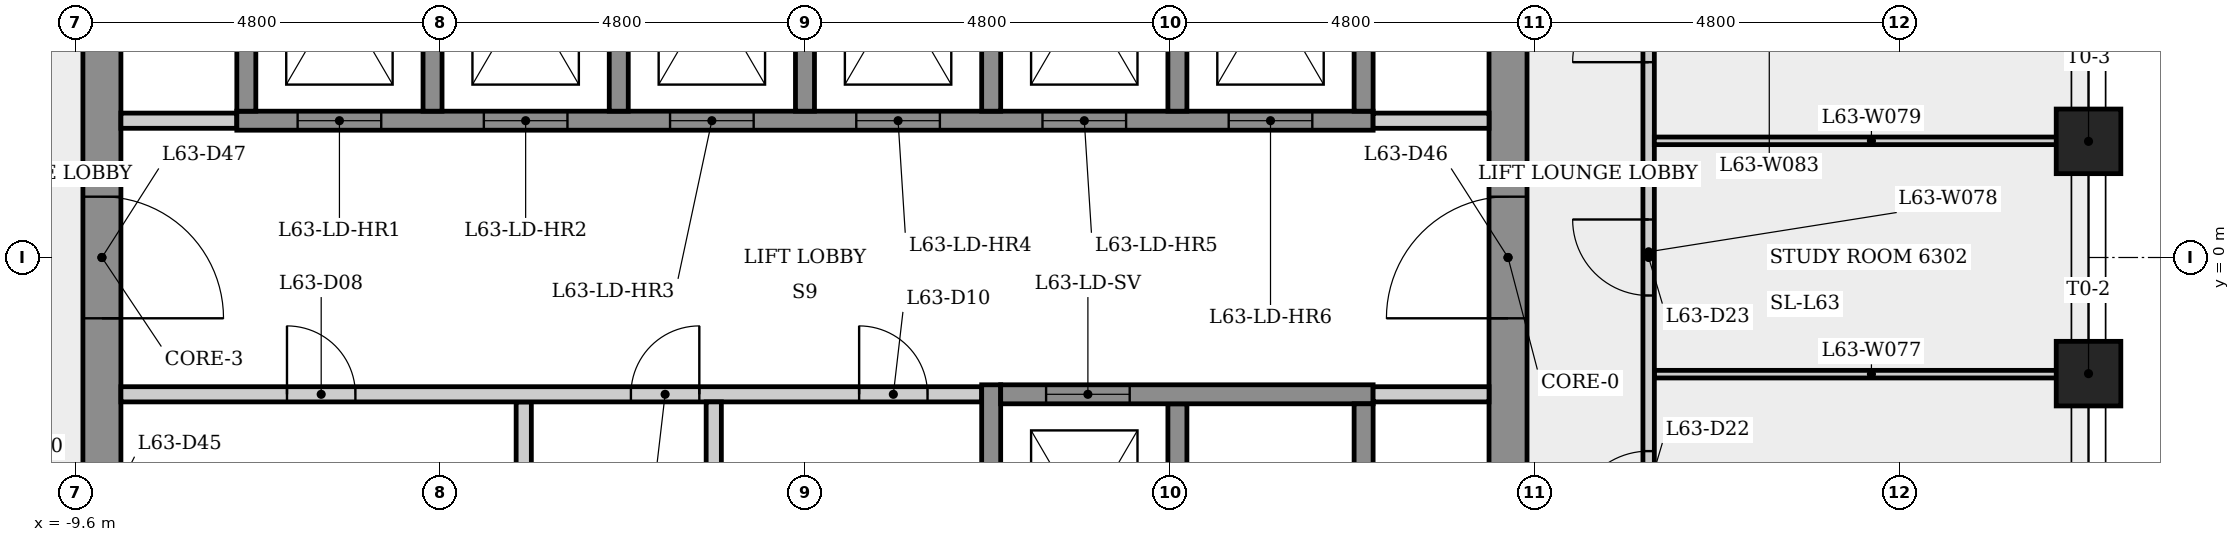
"""IFC4 building model, lengths in metres.
Left out: names, types, materials, properties, quantities, classifications, styles, units other than length and angle.
Written with IfcOpenShell. Run it as: python <this file> out.ifc"""

import sys

from ifc_helpers import new_model, si_unit, direction, frame, frame_2d, origin, origin_2d, place, context, subcontext, project, spatial, rectangle, extrude, element, fill, save


model = new_model("IFC4")
c1 = context("Model", 3, precision=1e-05, world=origin(), true_north=direction((0.0, 1.0)))
c2 = subcontext(c1, "Body", "Model", "MODEL_VIEW")
j1 = project(units=[si_unit("LENGTHUNIT", "METRE"), si_unit("PLANEANGLEUNIT", "RADIAN")], contexts=[c1])
p1 = place(None, origin())
s1 = spatial("IfcSite", under=j1, at=p1, CompositionType="ELEMENT")
p2 = place(p1, origin())
s2 = spatial("IfcBuilding", under=s1, at=p2, CompositionType="ELEMENT")
p3 = place(p2, frame((0.0, 0.0, 235.9)))
s3 = spatial("IfcBuildingStorey", under=s2, at=p3, CompositionType="ELEMENT", Elevation=235.9)
p4 = place(p3, frame((9.25, -5.485, 0.0), z_axis=(0.0, 0.0, 1.0), x_axis=(0.0, 1.0, 0.0)))
e1 = element("IfcWall", 1, at=p4, inside=s3, PredefinedType="SHEAR", context=c2, shape_type="SweptSolid", body=[
    extrude(rectangle(XDim=10.97, YDim=0.5, at=frame_2d((5.485, 0.0))), origin(), (0.0, 0.0, 1.0), 3.4),
])
p5 = place(p4, frame((4.685, 0.0, 0.0)))
e2 = element("IfcOpeningElement", 2, at=p5, cuts=e1, PredefinedType="OPENING", context=c2, shape_type="SweptSolid", body=[
    extrude(rectangle(XDim=1.6, YDim=2.1, at=frame_2d((0.8, 1.05))), frame((0.0, 0.26, 0.0), z_axis=(0.0, -1.0, 0.0), x_axis=(1.0, 0.0, 0.0)), (0.0, 0.0, 1.0), 0.52),
])
p6 = place(p3, frame((-9.25, 5.485, 0.0), z_axis=(0.0, 0.0, 1.0), x_axis=(0.0, -1.0, 0.0)))
e3 = element("IfcWall", 3, at=p6, inside=s3, PredefinedType="SHEAR", context=c2, shape_type="SweptSolid", body=[
    extrude(rectangle(XDim=10.97, YDim=0.5, at=frame_2d((5.485, 0.0))), origin(), (0.0, 0.0, 1.0), 3.4),
])
p7 = place(p6, frame((8.51, 0.0, 0.0)))
e4 = element("IfcOpeningElement", 4, at=p7, cuts=e3, PredefinedType="OPENING", context=c2, shape_type="SweptSolid", body=[
    extrude(rectangle(XDim=0.9, YDim=2.1, at=frame_2d((0.45, 1.05))), frame((0.0, 0.26, 0.0), z_axis=(0.0, -1.0, 0.0), x_axis=(1.0, 0.0, 0.0)), (0.0, 0.0, 1.0), 0.52),
])
p8 = place(p6, frame((4.685, 0.0, 0.0)))
e5 = element("IfcOpeningElement", 5, at=p8, cuts=e3, PredefinedType="OPENING", context=c2, shape_type="SweptSolid", body=[
    extrude(rectangle(XDim=1.6, YDim=2.1, at=frame_2d((0.8, 1.05))), frame((0.0, 0.26, 0.0), z_axis=(0.0, -1.0, 0.0), x_axis=(1.0, 0.0, 0.0)), (0.0, 0.0, 1.0), 0.52),
])
for number, where, z_axis, x_axis in (
    (6, (16.887, -1.528, 0.0), (0.0, 0.0, 1.0), (1.0, 0.0, 0.0)),
    (7, (16.887, 1.528, 0.0), (0.0, 0.0, 1.0), (1.0, 0.0, 0.0)),
):
    element("IfcColumn", number, at=place(p3, frame(where, z_axis=z_axis, x_axis=x_axis)), inside=s3, PredefinedType="COLUMN", context=c2, shape_type="SweptSolid", body=[
        extrude(rectangle(XDim=0.85, YDim=0.85, at=origin_2d()), origin(), (0.0, 0.0, 1.0), 3.4),
    ])
p9 = place(p3, frame((-9.0, 1.8, 0.0), z_axis=(0.0, 0.0, 1.0), x_axis=(1.0, 0.0, 0.0)))
e8 = element("IfcWall", 8, at=p9, inside=s3, PredefinedType="PARTITIONING", context=c2, shape_type="SweptSolid", body=[
    extrude(rectangle(XDim=1.525, YDim=0.2, at=frame_2d((0.763, 0.0))), origin(), (0.0, 0.0, 1.0), 3.05),
])
p10 = place(p3, frame((-7.475, 1.8, 0.0), z_axis=(0.0, 0.0, 1.0), x_axis=(1.0, 0.0, 0.0)))
e9 = element("IfcWall", 9, at=p10, inside=s3, PredefinedType="SHEAR", context=c2, shape_type="SweptSolid", body=[
    extrude(rectangle(XDim=14.95, YDim=0.25, at=frame_2d((7.475, 0.0))), origin(), (0.0, 0.0, 1.0), 3.05),
])
p11 = place(p10, frame((0.8, 0.0, 0.0)))
e10 = element("IfcOpeningElement", 10, at=p11, cuts=e9, PredefinedType="OPENING", context=c2, shape_type="SweptSolid", body=[
    extrude(rectangle(XDim=1.1, YDim=2.1, at=frame_2d((0.55, 1.05))), frame((0.0, 0.135, 0.0), z_axis=(0.0, -1.0, 0.0), x_axis=(1.0, 0.0, 0.0)), (0.0, 0.0, 1.0), 0.27),
])
p12 = place(p10, frame((3.25, 0.0, 0.0)))
e11 = element("IfcOpeningElement", 11, at=p12, cuts=e9, PredefinedType="OPENING", context=c2, shape_type="SweptSolid", body=[
    extrude(rectangle(XDim=1.1, YDim=2.1, at=frame_2d((0.55, 1.05))), frame((0.0, 0.135, 0.0), z_axis=(0.0, -1.0, 0.0), x_axis=(1.0, 0.0, 0.0)), (0.0, 0.0, 1.0), 0.27),
])
p13 = place(p10, frame((5.7, 0.0, 0.0)))
e12 = element("IfcOpeningElement", 12, at=p13, cuts=e9, PredefinedType="OPENING", context=c2, shape_type="SweptSolid", body=[
    extrude(rectangle(XDim=1.1, YDim=2.1, at=frame_2d((0.55, 1.05))), frame((0.0, 0.135, 0.0), z_axis=(0.0, -1.0, 0.0), x_axis=(1.0, 0.0, 0.0)), (0.0, 0.0, 1.0), 0.27),
])
p14 = place(p10, frame((8.15, 0.0, 0.0)))
e13 = element("IfcOpeningElement", 13, at=p14, cuts=e9, PredefinedType="OPENING", context=c2, shape_type="SweptSolid", body=[
    extrude(rectangle(XDim=1.1, YDim=2.1, at=frame_2d((0.55, 1.05))), frame((0.0, 0.135, 0.0), z_axis=(0.0, -1.0, 0.0), x_axis=(1.0, 0.0, 0.0)), (0.0, 0.0, 1.0), 0.27),
])
p15 = place(p10, frame((10.6, 0.0, 0.0)))
e14 = element("IfcOpeningElement", 14, at=p15, cuts=e9, PredefinedType="OPENING", context=c2, shape_type="SweptSolid", body=[
    extrude(rectangle(XDim=1.1, YDim=2.1, at=frame_2d((0.55, 1.05))), frame((0.0, 0.135, 0.0), z_axis=(0.0, -1.0, 0.0), x_axis=(1.0, 0.0, 0.0)), (0.0, 0.0, 1.0), 0.27),
])
p16 = place(p10, frame((13.05, 0.0, 0.0)))
e15 = element("IfcOpeningElement", 15, at=p16, cuts=e9, PredefinedType="OPENING", context=c2, shape_type="SweptSolid", body=[
    extrude(rectangle(XDim=1.1, YDim=2.1, at=frame_2d((0.55, 1.05))), frame((0.0, 0.135, 0.0), z_axis=(0.0, -1.0, 0.0), x_axis=(1.0, 0.0, 0.0)), (0.0, 0.0, 1.0), 0.27),
])
p17 = place(p3, frame((-7.35, 1.925, 0.0), z_axis=(0.0, 0.0, 1.0), x_axis=(0.0, 1.0, 0.0)))
e16 = element("IfcWall", 16, at=p17, inside=s3, PredefinedType="SHEAR", context=c2, shape_type="SweptSolid", body=[
    extrude(rectangle(XDim=3.35, YDim=0.25, at=frame_2d((1.675, 0.0))), origin(), (0.0, 0.0, 1.0), 3.05),
])
p18 = place(p3, frame((-4.9, 5.025, 0.0), z_axis=(0.0, 0.0, 1.0), x_axis=(0.0, -1.0, 0.0)))
e17 = element("IfcWall", 17, at=p18, inside=s3, PredefinedType="SHEAR", context=c2, shape_type="SweptSolid", body=[
    extrude(rectangle(XDim=3.1, YDim=0.25, at=frame_2d((1.55, 0.0))), origin(), (0.0, 0.0, 1.0), 3.4),
])
p19 = place(p3, frame((-3.7, -1.9, 0.0), z_axis=(0.0, 0.0, 1.0), x_axis=(0.0, -1.0, 0.0)))
e18 = element("IfcWall", 18, at=p19, inside=s3, PredefinedType="PARTITIONING", context=c2, shape_type="SweptSolid", body=[
    extrude(rectangle(XDim=3.15, YDim=0.2, at=frame_2d((1.575, 0.0))), origin(), (0.0, 0.0, 1.0), 3.05),
])
p20 = place(p3, frame((-9.0, -1.8, 0.0), z_axis=(0.0, 0.0, 1.0), x_axis=(1.0, 0.0, 0.0)))
e19 = element("IfcWall", 19, at=p20, inside=s3, PredefinedType="PARTITIONING", context=c2, shape_type="SweptSolid", body=[
    extrude(rectangle(XDim=11.325, YDim=0.2, at=frame_2d((5.663, 0.0))), origin(), (0.0, 0.0, 1.0), 3.05),
])
p21 = place(p20, frame((2.185, 0.0, 0.0)))
e20 = element("IfcOpeningElement", 20, at=p21, cuts=e19, PredefinedType="OPENING", context=c2, shape_type="SweptSolid", body=[
    extrude(rectangle(XDim=0.9, YDim=2.1, at=frame_2d((0.45, 1.05))), frame((0.0, 0.11, 0.0), z_axis=(0.0, -1.0, 0.0), x_axis=(1.0, 0.0, 0.0)), (0.0, 0.0, 1.0), 0.22),
])
p22 = place(p20, frame((6.71, 0.0, 0.0)))
e21 = element("IfcOpeningElement", 21, at=p22, cuts=e19, PredefinedType="OPENING", context=c2, shape_type="SweptSolid", body=[
    extrude(rectangle(XDim=0.9, YDim=2.1, at=frame_2d((0.45, 1.05))), frame((0.0, 0.11, 0.0), z_axis=(0.0, -1.0, 0.0), x_axis=(1.0, 0.0, 0.0)), (0.0, 0.0, 1.0), 0.22),
])
p23 = place(p20, frame((9.713, 0.0, 0.0)))
e22 = element("IfcOpeningElement", 22, at=p23, cuts=e19, PredefinedType="OPENING", context=c2, shape_type="SweptSolid", body=[
    extrude(rectangle(XDim=0.9, YDim=2.1, at=frame_2d((0.45, 1.05))), frame((0.0, 0.11, 0.0), z_axis=(0.0, -1.0, 0.0), x_axis=(1.0, 0.0, 0.0)), (0.0, 0.0, 1.0), 0.22),
])
p24 = place(p3, frame((-2.45, 5.025, 0.0), z_axis=(0.0, 0.0, 1.0), x_axis=(0.0, -1.0, 0.0)))
e23 = element("IfcWall", 23, at=p24, inside=s3, PredefinedType="SHEAR", context=c2, shape_type="SweptSolid", body=[
    extrude(rectangle(XDim=3.1, YDim=0.25, at=frame_2d((1.55, 0.0))), origin(), (0.0, 0.0, 1.0), 3.4),
])
p25 = place(p3, frame((-1.2, -1.9, 0.0), z_axis=(0.0, 0.0, 1.0), x_axis=(0.0, -1.0, 0.0)))
e24 = element("IfcWall", 24, at=p25, inside=s3, PredefinedType="PARTITIONING", context=c2, shape_type="SweptSolid", body=[
    extrude(rectangle(XDim=3.15, YDim=0.2, at=frame_2d((1.575, 0.0))), origin(), (0.0, 0.0, 1.0), 3.05),
])
p26 = place(p3, frame((0.0, 5.025, 0.0), z_axis=(0.0, 0.0, 1.0), x_axis=(0.0, -1.0, 0.0)))
e25 = element("IfcWall", 25, at=p26, inside=s3, PredefinedType="SHEAR", context=c2, shape_type="SweptSolid", body=[
    extrude(rectangle(XDim=3.1, YDim=0.25, at=frame_2d((1.55, 0.0))), origin(), (0.0, 0.0, 1.0), 3.4),
])
p27 = place(p3, frame((2.45, -5.275, 0.0), z_axis=(0.0, 0.0, 1.0), x_axis=(0.0, 1.0, 0.0)))
e26 = element("IfcWall", 26, at=p27, inside=s3, PredefinedType="SHEAR", context=c2, shape_type="SweptSolid", body=[
    extrude(rectangle(XDim=3.6, YDim=0.25, at=frame_2d((1.8, 0.0))), origin(), (0.0, 0.0, 1.0), 3.05),
])
for number, where, z_axis, x_axis in (
    (27, (2.45, 5.025, 0.0), (0.0, 0.0, 1.0), (0.0, -1.0, 0.0)),
    (28, (4.9, -1.925, 0.0), (0.0, 0.0, 1.0), (0.0, -1.0, 0.0)),
    (29, (4.9, 5.025, 0.0), (0.0, 0.0, 1.0), (0.0, -1.0, 0.0)),
):
    element("IfcWall", number, at=place(p3, frame(where, z_axis=z_axis, x_axis=x_axis)), inside=s3, PredefinedType="SHEAR", context=c2, shape_type="SweptSolid", body=[
        extrude(rectangle(XDim=3.1, YDim=0.25, at=frame_2d((1.55, 0.0))), origin(), (0.0, 0.0, 1.0), 3.4),
    ])
p28 = place(p3, frame((2.575, -1.8, 0.0), z_axis=(0.0, 0.0, 1.0), x_axis=(1.0, 0.0, 0.0)))
e30 = element("IfcWall", 30, at=p28, inside=s3, PredefinedType="SHEAR", context=c2, shape_type="SweptSolid", body=[
    extrude(rectangle(XDim=4.9, YDim=0.25, at=frame_2d((2.45, 0.0))), origin(), (0.0, 0.0, 1.0), 3.05),
])
p29 = place(p28, frame((0.597, 0.0, 0.0)))
e31 = element("IfcOpeningElement", 31, at=p29, cuts=e30, PredefinedType="OPENING", context=c2, shape_type="SweptSolid", body=[
    extrude(rectangle(XDim=1.1, YDim=2.1, at=frame_2d((0.55, 1.05))), frame((0.0, 0.135, 0.0), z_axis=(0.0, -1.0, 0.0), x_axis=(1.0, 0.0, 0.0)), (0.0, 0.0, 1.0), 0.27),
])
p30 = place(p3, frame((7.475, 1.8, 0.0), z_axis=(0.0, 0.0, 1.0), x_axis=(1.0, 0.0, 0.0)))
e32 = element("IfcWall", 32, at=p30, inside=s3, PredefinedType="PARTITIONING", context=c2, shape_type="SweptSolid", body=[
    extrude(rectangle(XDim=1.525, YDim=0.2, at=frame_2d((0.763, 0.0))), origin(), (0.0, 0.0, 1.0), 3.05),
])
for number, where, z_axis, x_axis in (
    (33, (7.35, -1.925, 0.0), (0.0, 0.0, 1.0), (0.0, -1.0, 0.0)),
    (34, (7.35, 5.025, 0.0), (0.0, 0.0, 1.0), (0.0, -1.0, 0.0)),
):
    element("IfcWall", number, at=place(p3, frame(where, z_axis=z_axis, x_axis=x_axis)), inside=s3, PredefinedType="SHEAR", context=c2, shape_type="SweptSolid", body=[
        extrude(rectangle(XDim=3.1, YDim=0.25, at=frame_2d((1.55, 0.0))), origin(), (0.0, 0.0, 1.0), 3.4),
    ])
p31 = place(p3, frame((9.0, -1.8, 0.0), z_axis=(0.0, 0.0, 1.0), x_axis=(-1.0, 0.0, 0.0)))
e35 = element("IfcWall", 35, at=p31, inside=s3, PredefinedType="PARTITIONING", context=c2, shape_type="SweptSolid", body=[
    extrude(rectangle(XDim=1.525, YDim=0.2, at=frame_2d((0.763, 0.0))), origin(), (0.0, 0.0, 1.0), 3.05),
])
p32 = place(p3, frame((11.175, -1.535, 0.0), z_axis=(0.0, 0.0, 1.0), x_axis=(1.0, 0.0, 0.0)))
e36 = element("IfcWall", 36, at=p32, inside=s3, PredefinedType="PARTITIONING", context=c2, shape_type="SweptSolid", body=[
    extrude(rectangle(XDim=5.712, YDim=0.1, at=frame_2d((2.856, 0.0))), origin(), (0.0, 0.0, 1.0), 3.05),
])
p33 = place(p3, frame((11.1, -4.53, 0.0), z_axis=(0.0, 0.0, 1.0), x_axis=(0.0, 1.0, 0.0)))
e37 = element("IfcWall", 37, at=p33, inside=s3, PredefinedType="PARTITIONING", context=c2, shape_type="SweptSolid", body=[
    extrude(rectangle(XDim=9.21, YDim=0.15, at=frame_2d((4.605, 0.0))), origin(), (0.0, 0.0, 1.0), 3.05),
])
p34 = place(p33, frame((0.983, 0.0, 0.0)))
e38 = element("IfcOpeningElement", 38, at=p34, cuts=e37, PredefinedType="OPENING", context=c2, shape_type="SweptSolid", body=[
    extrude(rectangle(XDim=1.0, YDim=2.1, at=frame_2d((0.5, 1.05))), frame((0.0, 0.085, 0.0), z_axis=(0.0, -1.0, 0.0), x_axis=(1.0, 0.0, 0.0)), (0.0, 0.0, 1.0), 0.17),
])
p35 = place(p33, frame((4.03, 0.0, 0.0)))
e39 = element("IfcOpeningElement", 39, at=p35, cuts=e37, PredefinedType="OPENING", context=c2, shape_type="SweptSolid", body=[
    extrude(rectangle(XDim=1.0, YDim=2.1, at=frame_2d((0.5, 1.05))), frame((0.0, 0.085, 0.0), z_axis=(0.0, -1.0, 0.0), x_axis=(1.0, 0.0, 0.0)), (0.0, 0.0, 1.0), 0.17),
])
p36 = place(p33, frame((7.1, 0.0, 0.0)))
e40 = element("IfcOpeningElement", 40, at=p36, cuts=e37, PredefinedType="OPENING", context=c2, shape_type="SweptSolid", body=[
    extrude(rectangle(XDim=1.0, YDim=2.1, at=frame_2d((0.5, 1.05))), frame((0.0, 0.085, 0.0), z_axis=(0.0, -1.0, 0.0), x_axis=(1.0, 0.0, 0.0)), (0.0, 0.0, 1.0), 0.17),
])
p37 = place(p3, frame((11.175, 1.535, 0.0), z_axis=(0.0, 0.0, 1.0), x_axis=(1.0, 0.0, 0.0)))
e41 = element("IfcWall", 41, at=p37, inside=s3, PredefinedType="PARTITIONING", context=c2, shape_type="SweptSolid", body=[
    extrude(rectangle(XDim=5.712, YDim=0.1, at=frame_2d((2.856, 0.0))), origin(), (0.0, 0.0, 1.0), 3.05),
])
p38 = place(p11, origin())
e42 = element("IfcDoor", 42, at=p38, inside=s3, OperationType="SLIDING_TO_LEFT", PredefinedType="DOOR", context=c2, shape_type="SweptSolid", body=[
    extrude(rectangle(XDim=1.1, YDim=2.1, at=frame_2d((0.55, 1.05))), frame((0.0, 0.025, 0.0), z_axis=(0.0, -1.0, 0.0), x_axis=(1.0, 0.0, 0.0)), (0.0, 0.0, 1.0), 0.05),
])
fill(e10, e42)
p39 = place(p12, origin())
e43 = element("IfcDoor", 43, at=p39, inside=s3, OperationType="SLIDING_TO_LEFT", PredefinedType="DOOR", context=c2, shape_type="SweptSolid", body=[
    extrude(rectangle(XDim=1.1, YDim=2.1, at=frame_2d((0.55, 1.05))), frame((0.0, 0.025, 0.0), z_axis=(0.0, -1.0, 0.0), x_axis=(1.0, 0.0, 0.0)), (0.0, 0.0, 1.0), 0.05),
])
fill(e11, e43)
p40 = place(p13, origin())
e44 = element("IfcDoor", 44, at=p40, inside=s3, OperationType="SLIDING_TO_LEFT", PredefinedType="DOOR", context=c2, shape_type="SweptSolid", body=[
    extrude(rectangle(XDim=1.1, YDim=2.1, at=frame_2d((0.55, 1.05))), frame((0.0, 0.025, 0.0), z_axis=(0.0, -1.0, 0.0), x_axis=(1.0, 0.0, 0.0)), (0.0, 0.0, 1.0), 0.05),
])
fill(e12, e44)
p41 = place(p14, origin())
e45 = element("IfcDoor", 45, at=p41, inside=s3, OperationType="SLIDING_TO_LEFT", PredefinedType="DOOR", context=c2, shape_type="SweptSolid", body=[
    extrude(rectangle(XDim=1.1, YDim=2.1, at=frame_2d((0.55, 1.05))), frame((0.0, 0.025, 0.0), z_axis=(0.0, -1.0, 0.0), x_axis=(1.0, 0.0, 0.0)), (0.0, 0.0, 1.0), 0.05),
])
fill(e13, e45)
p42 = place(p15, origin())
e46 = element("IfcDoor", 46, at=p42, inside=s3, OperationType="SLIDING_TO_LEFT", PredefinedType="DOOR", context=c2, shape_type="SweptSolid", body=[
    extrude(rectangle(XDim=1.1, YDim=2.1, at=frame_2d((0.55, 1.05))), frame((0.0, 0.025, 0.0), z_axis=(0.0, -1.0, 0.0), x_axis=(1.0, 0.0, 0.0)), (0.0, 0.0, 1.0), 0.05),
])
fill(e14, e46)
p43 = place(p16, origin())
e47 = element("IfcDoor", 47, at=p43, inside=s3, OperationType="SLIDING_TO_LEFT", PredefinedType="DOOR", context=c2, shape_type="SweptSolid", body=[
    extrude(rectangle(XDim=1.1, YDim=2.1, at=frame_2d((0.55, 1.05))), frame((0.0, 0.025, 0.0), z_axis=(0.0, -1.0, 0.0), x_axis=(1.0, 0.0, 0.0)), (0.0, 0.0, 1.0), 0.05),
])
fill(e15, e47)
p44 = place(p29, origin())
e48 = element("IfcDoor", 48, at=p44, inside=s3, OperationType="SLIDING_TO_LEFT", PredefinedType="DOOR", context=c2, shape_type="SweptSolid", body=[
    extrude(rectangle(XDim=1.1, YDim=2.1, at=frame_2d((0.55, 1.05))), frame((0.0, 0.025, 0.0), z_axis=(0.0, -1.0, 0.0), x_axis=(1.0, 0.0, 0.0)), (0.0, 0.0, 1.0), 0.05),
])
fill(e31, e48)
p45 = place(p21, origin())
e49 = element("IfcDoor", 49, at=p45, inside=s3, OperationType="SINGLE_SWING_LEFT", PredefinedType="DOOR", context=c2, shape_type="SweptSolid", body=[
    extrude(rectangle(XDim=0.9, YDim=2.1, at=frame_2d((0.45, 1.05))), frame((0.0, 0.025, 0.0), z_axis=(0.0, -1.0, 0.0), x_axis=(1.0, 0.0, 0.0)), (0.0, 0.0, 1.0), 0.05),
])
fill(e20, e49)
p46 = place(p22, origin())
e50 = element("IfcDoor", 50, at=p46, inside=s3, OperationType="SINGLE_SWING_RIGHT", PredefinedType="DOOR", context=c2, shape_type="SweptSolid", body=[
    extrude(rectangle(XDim=0.9, YDim=2.1, at=frame_2d((0.45, 1.05))), frame((0.0, 0.025, 0.0), z_axis=(0.0, -1.0, 0.0), x_axis=(1.0, 0.0, 0.0)), (0.0, 0.0, 1.0), 0.05),
])
fill(e21, e50)
p47 = place(p23, origin())
e51 = element("IfcDoor", 51, at=p47, inside=s3, OperationType="SINGLE_SWING_LEFT", PredefinedType="DOOR", context=c2, shape_type="SweptSolid", body=[
    extrude(rectangle(XDim=0.9, YDim=2.1, at=frame_2d((0.45, 1.05))), frame((0.0, 0.025, 0.0), z_axis=(0.0, -1.0, 0.0), x_axis=(1.0, 0.0, 0.0)), (0.0, 0.0, 1.0), 0.05),
])
fill(e22, e51)
p48 = place(p34, origin())
e52 = element("IfcDoor", 52, at=p48, inside=s3, OperationType="SINGLE_SWING_LEFT", PredefinedType="DOOR", context=c2, shape_type="SweptSolid", body=[
    extrude(rectangle(XDim=1.0, YDim=2.1, at=frame_2d((0.5, 1.05))), frame((0.0, 0.025, 0.0), z_axis=(0.0, -1.0, 0.0), x_axis=(1.0, 0.0, 0.0)), (0.0, 0.0, 1.0), 0.05),
])
fill(e38, e52)
p49 = place(p35, origin())
e53 = element("IfcDoor", 53, at=p49, inside=s3, OperationType="SINGLE_SWING_RIGHT", PredefinedType="DOOR", context=c2, shape_type="SweptSolid", body=[
    extrude(rectangle(XDim=1.0, YDim=2.1, at=frame_2d((0.5, 1.05))), frame((0.0, 0.025, 0.0), z_axis=(0.0, -1.0, 0.0), x_axis=(1.0, 0.0, 0.0)), (0.0, 0.0, 1.0), 0.05),
])
fill(e39, e53)
p50 = place(p36, origin())
e54 = element("IfcDoor", 54, at=p50, inside=s3, OperationType="SINGLE_SWING_LEFT", PredefinedType="DOOR", context=c2, shape_type="SweptSolid", body=[
    extrude(rectangle(XDim=1.0, YDim=2.1, at=frame_2d((0.5, 1.05))), frame((0.0, 0.025, 0.0), z_axis=(0.0, -1.0, 0.0), x_axis=(1.0, 0.0, 0.0)), (0.0, 0.0, 1.0), 0.05),
])
fill(e40, e54)
p51 = place(p5, origin())
e55 = element("IfcDoor", 55, at=p51, inside=s3, OperationType="SINGLE_SWING_LEFT", PredefinedType="DOOR", context=c2, shape_type="SweptSolid", body=[
    extrude(rectangle(XDim=1.6, YDim=2.1, at=frame_2d((0.8, 1.05))), frame((0.0, 0.025, 0.0), z_axis=(0.0, -1.0, 0.0), x_axis=(1.0, 0.0, 0.0)), (0.0, 0.0, 1.0), 0.05),
])
fill(e2, e55)
p52 = place(p8, origin())
e56 = element("IfcDoor", 56, at=p52, inside=s3, OperationType="SINGLE_SWING_RIGHT", PredefinedType="DOOR", context=c2, shape_type="SweptSolid", body=[
    extrude(rectangle(XDim=1.6, YDim=2.1, at=frame_2d((0.8, 1.05))), frame((0.0, 0.025, 0.0), z_axis=(0.0, -1.0, 0.0), x_axis=(1.0, 0.0, 0.0)), (0.0, 0.0, 1.0), 0.05),
])
fill(e5, e56)
save(model, sys.argv[1])
